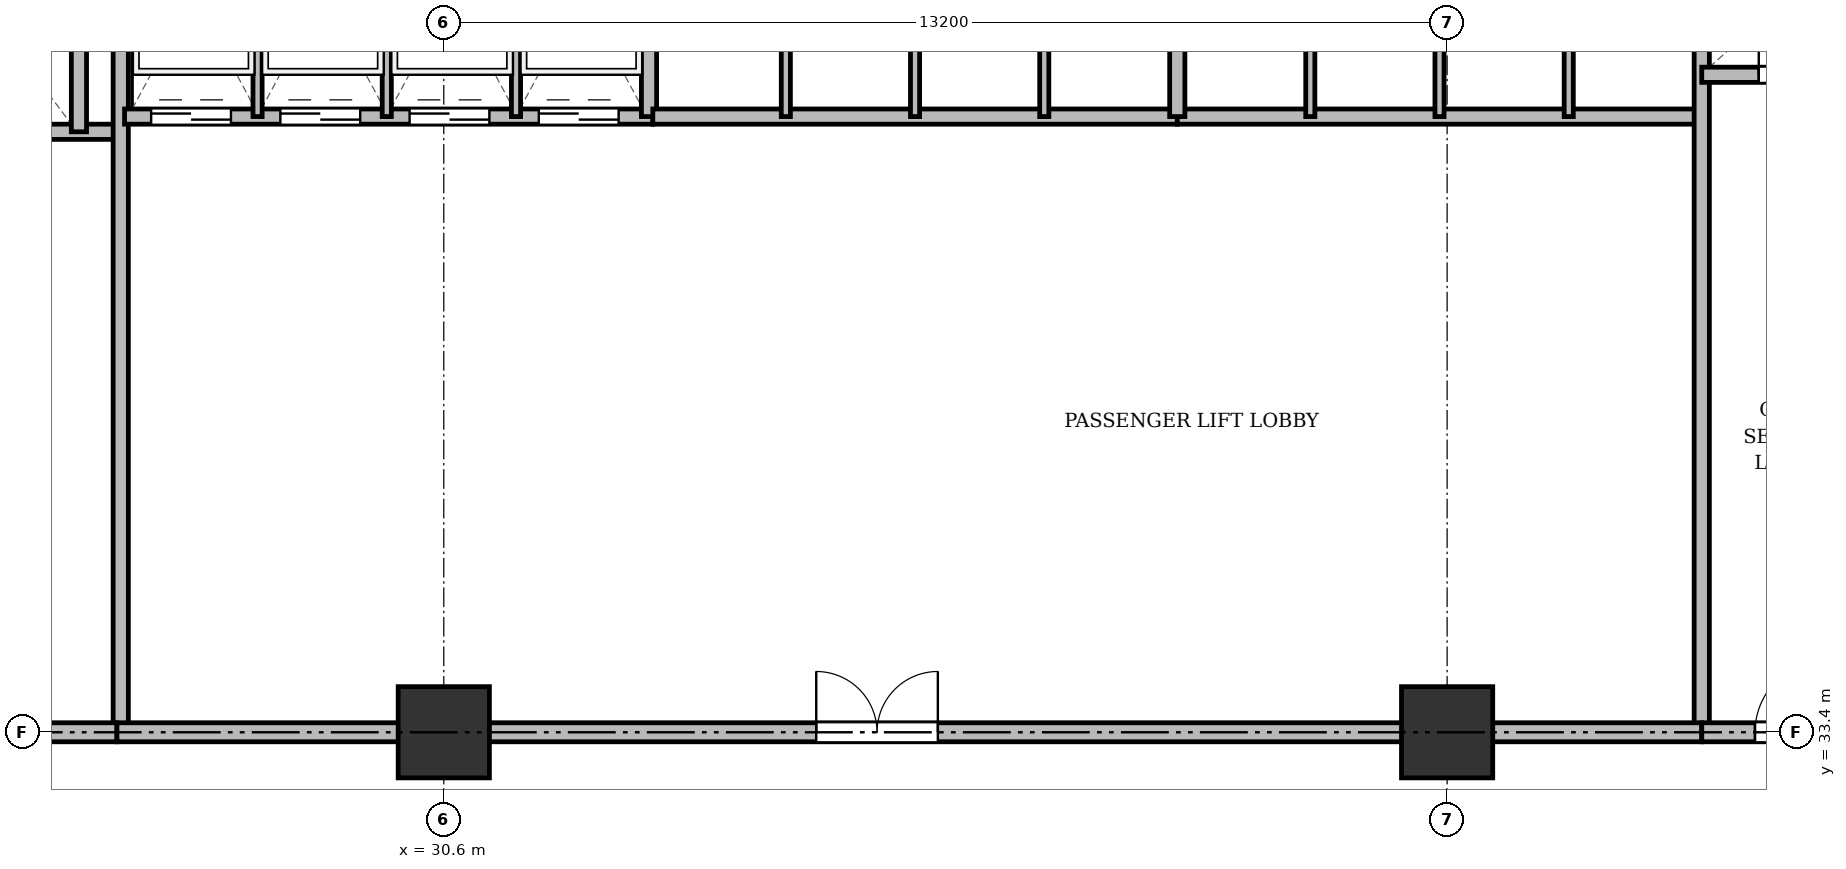
"""IFC4 building model, lengths in metres.
Left out: names, types, materials, properties, quantities, classifications, styles, units other than length and angle.
Written with IfcOpenShell. Run it as: python <this file> out.ifc"""

import sys

from ifc_helpers import new_model, si_unit, direction, frame, frame_2d, origin, origin_2d, place, context, subcontext, project, spatial, rectangle, extrude, source, transform, mapped, element, fill, save


model = new_model("IFC4")
c1 = context("Model", 3, precision=1e-05, world=origin(), true_north=direction((0.0, 1.0)))
c2 = subcontext(c1, "Body", "Model", "MODEL_VIEW")
j1 = project(units=[si_unit("LENGTHUNIT", "METRE"), si_unit("PLANEANGLEUNIT", "RADIAN")], contexts=[c1])
p1 = place(None, origin())
s1 = spatial("IfcSite", under=j1, at=p1, CompositionType="ELEMENT")
p2 = place(p1, origin())
s2 = spatial("IfcBuilding", under=s1, at=p2, CompositionType="ELEMENT")
p3 = place(p2, frame((0.0, 0.0, 5.2)))
s3 = spatial("IfcBuildingStorey", under=s2, at=p3, CompositionType="ELEMENT", Elevation=5.2)
m1 = source(origin(), c2, "Body", "SweptSolid", [
    extrude(rectangle(XDim=1.2, YDim=1.2, at=origin_2d()), origin(), (0.0, 0.0, 1.0), 4.5),
])
for number, where, z_axis, x_axis in (
    (1, (30.6, 33.4, 0.0), (0.0, 0.0, 1.0), (1.0, 0.0, 0.0)),
    (2, (43.8, 33.4, 0.0), (0.0, 0.0, 1.0), (1.0, 0.0, 0.0)),
):
    element("IfcColumn", number, at=place(p3, frame(where, z_axis=z_axis, x_axis=x_axis)), inside=s3, PredefinedType="COLUMN", context=c2, shape_type="MappedRepresentation", body=[
        mapped(m1, transform((0.0, 0.0, 0.0), x_axis=(1.0, 0.0, 0.0), y_axis=(0.0, 1.0, 0.0), z_axis=(0.0, 0.0, 1.0), scale=1.0)),
    ])
p4 = place(p3, frame((19.55, 41.3, 0.0), z_axis=(0.0, 0.0, 1.0), x_axis=(1.0, 0.0, 0.0)))
e3 = element("IfcWall", 3, at=p4, inside=s3, PredefinedType="SOLIDWALL", context=c2, shape_type="SweptSolid", body=[
    extrude(rectangle(XDim=6.75, YDim=0.2, at=frame_2d((3.375, 0.0))), origin(), (0.0, 0.0, 1.0), 4.2),
])
p5 = place(p4, frame((1.7, 0.0, 0.0)))
e4 = element("IfcOpeningElement", 4, at=p5, cuts=e3, PredefinedType="OPENING", context=c2, shape_type="SweptSolid", body=[
    extrude(rectangle(XDim=1.1, YDim=2.15, at=frame_2d((0.55, 1.075))), frame((0.0, 0.11, 0.0), z_axis=(0.0, -1.0, 0.0), x_axis=(1.0, 0.0, 0.0)), (0.0, 0.0, 1.0), 0.22),
])
p6 = place(p4, frame((4.4, 0.0, 0.0)))
e5 = element("IfcOpeningElement", 5, at=p6, cuts=e3, PredefinedType="OPENING", context=c2, shape_type="SweptSolid", body=[
    extrude(rectangle(XDim=1.1, YDim=2.15, at=frame_2d((0.55, 1.075))), frame((0.0, 0.11, 0.0), z_axis=(0.0, -1.0, 0.0), x_axis=(1.0, 0.0, 0.0)), (0.0, 0.0, 1.0), 0.22),
])
p7 = place(p3, frame((25.8, 41.3, 0.0), z_axis=(0.0, 0.0, 1.0), x_axis=(0.0, 1.0, 0.0)))
e6 = element("IfcWall", 6, at=p7, inside=s3, PredefinedType="SOLIDWALL", context=c2, shape_type="SweptSolid", body=[
    extrude(rectangle(XDim=3.4, YDim=0.2, at=frame_2d((1.7, 0.0))), origin(), (0.0, 0.0, 1.0), 4.2),
])
p8 = place(p3, frame((26.35, 33.4, 0.0), z_axis=(0.0, 0.0, 1.0), x_axis=(0.0, 1.0, 0.0)))
e7 = element("IfcWall", 7, at=p8, inside=s3, PredefinedType="SOLIDWALL", context=c2, shape_type="SweptSolid", body=[
    extrude(rectangle(XDim=11.3, YDim=0.2, at=frame_2d((5.65, 0.0))), origin(), (0.0, 0.0, 1.0), 3.1),
])
p9 = place(p3, frame((19.5, 33.4, 0.0), z_axis=(0.0, 0.0, 1.0), x_axis=(1.0, 0.0, 0.0)))
e8 = element("IfcWall", 8, at=p9, inside=s3, PredefinedType="PARTITIONING", context=c2, shape_type="SweptSolid", body=[
    extrude(rectangle(XDim=6.8, YDim=0.25, at=frame_2d((3.4, 0.0))), origin(), (0.0, 0.0, 1.0), 3.1),
])
p10 = place(p9, frame((0.75, 0.0, 0.0)))
e9 = element("IfcOpeningElement", 9, at=p10, cuts=e8, PredefinedType="OPENING", context=c2, shape_type="SweptSolid", body=[
    extrude(rectangle(XDim=1.6, YDim=2.2, at=frame_2d((0.8, 1.1))), frame((0.0, 0.135, 0.0), z_axis=(0.0, -1.0, 0.0), x_axis=(1.0, 0.0, 0.0)), (0.0, 0.0, 1.0), 0.27),
])
p11 = place(p3, frame((26.4, 41.5, 0.0), z_axis=(0.0, 0.0, 1.0), x_axis=(1.0, 0.0, 0.0)))
e10 = element("IfcWall", 10, at=p11, inside=s3, PredefinedType="SOLIDWALL", context=c2, shape_type="SweptSolid", body=[
    extrude(rectangle(XDim=6.95, YDim=0.2, at=frame_2d((3.475, 0.0))), origin(), (0.0, 0.0, 1.0), 4.2),
])
p12 = place(p11, frame((0.35, 0.0, 0.0)))
e11 = element("IfcOpeningElement", 11, at=p12, cuts=e10, PredefinedType="OPENING", context=c2, shape_type="SweptSolid", body=[
    extrude(rectangle(XDim=1.05, YDim=2.15, at=frame_2d((0.525, 1.075))), frame((0.0, 0.11, 0.0), z_axis=(0.0, -1.0, 0.0), x_axis=(1.0, 0.0, 0.0)), (0.0, 0.0, 1.0), 0.22),
])
p13 = place(p11, frame((2.05, 0.0, 0.0)))
e12 = element("IfcOpeningElement", 12, at=p13, cuts=e10, PredefinedType="OPENING", context=c2, shape_type="SweptSolid", body=[
    extrude(rectangle(XDim=1.05, YDim=2.15, at=frame_2d((0.525, 1.075))), frame((0.0, 0.11, 0.0), z_axis=(0.0, -1.0, 0.0), x_axis=(1.0, 0.0, 0.0)), (0.0, 0.0, 1.0), 0.22),
])
p14 = place(p11, frame((3.75, 0.0, 0.0)))
e13 = element("IfcOpeningElement", 13, at=p14, cuts=e10, PredefinedType="OPENING", context=c2, shape_type="SweptSolid", body=[
    extrude(rectangle(XDim=1.05, YDim=2.15, at=frame_2d((0.525, 1.075))), frame((0.0, 0.11, 0.0), z_axis=(0.0, -1.0, 0.0), x_axis=(1.0, 0.0, 0.0)), (0.0, 0.0, 1.0), 0.22),
])
p15 = place(p11, frame((5.45, 0.0, 0.0)))
e14 = element("IfcOpeningElement", 14, at=p15, cuts=e10, PredefinedType="OPENING", context=c2, shape_type="SweptSolid", body=[
    extrude(rectangle(XDim=1.05, YDim=2.15, at=frame_2d((0.525, 1.075))), frame((0.0, 0.11, 0.0), z_axis=(0.0, -1.0, 0.0), x_axis=(1.0, 0.0, 0.0)), (0.0, 0.0, 1.0), 0.22),
])
p16 = place(p3, frame((33.3, 41.5, 0.0), z_axis=(0.0, 0.0, 1.0), x_axis=(0.0, 1.0, 0.0)))
e15 = element("IfcWall", 15, at=p16, inside=s3, PredefinedType="SOLIDWALL", context=c2, shape_type="SweptSolid", body=[
    extrude(rectangle(XDim=3.2, YDim=0.2, at=frame_2d((1.6, 0.0))), origin(), (0.0, 0.0, 1.0), 4.2),
])
for number, where, z_axis, x_axis in (
    (16, (28.15, 41.5, 0.0), (0.0, 0.0, 1.0), (0.0, 1.0, 0.0)),
    (17, (29.85, 41.5, 0.0), (0.0, 0.0, 1.0), (0.0, 1.0, 0.0)),
    (18, (31.55, 41.5, 0.0), (0.0, 0.0, 1.0), (0.0, 1.0, 0.0)),
):
    element("IfcWall", number, at=place(p3, frame(where, z_axis=z_axis, x_axis=x_axis)), inside=s3, PredefinedType="PARTITIONING", context=c2, shape_type="SweptSolid", body=[
        extrude(rectangle(XDim=3.2, YDim=0.12, at=frame_2d((1.6, 0.0))), origin(), (0.0, 0.0, 1.0), 4.2),
    ])
p17 = place(p3, frame((33.35, 41.5, 0.0), z_axis=(0.0, 0.0, 1.0), x_axis=(1.0, 0.0, 0.0)))
e19 = element("IfcWall", 19, at=p17, inside=s3, PredefinedType="SOLIDWALL", context=c2, shape_type="SweptSolid", body=[
    extrude(rectangle(XDim=6.9, YDim=0.2, at=frame_2d((3.45, 0.0))), origin(), (0.0, 0.0, 1.0), 4.2),
])
for number, where, z_axis, x_axis in (
    (20, (35.1, 41.5, 0.0), (0.0, 0.0, 1.0), (0.0, 1.0, 0.0)),
    (21, (36.8, 41.5, 0.0), (0.0, 0.0, 1.0), (0.0, 1.0, 0.0)),
    (22, (38.5, 41.5, 0.0), (0.0, 0.0, 1.0), (0.0, 1.0, 0.0)),
):
    element("IfcWall", number, at=place(p3, frame(where, z_axis=z_axis, x_axis=x_axis)), inside=s3, PredefinedType="PARTITIONING", context=c2, shape_type="SweptSolid", body=[
        extrude(rectangle(XDim=3.2, YDim=0.12, at=frame_2d((1.6, 0.0))), origin(), (0.0, 0.0, 1.0), 4.2),
    ])
p18 = place(p3, frame((40.25, 41.5, 0.0), z_axis=(0.0, 0.0, 1.0), x_axis=(1.0, 0.0, 0.0)))
e23 = element("IfcWall", 23, at=p18, inside=s3, PredefinedType="SOLIDWALL", context=c2, shape_type="SweptSolid", body=[
    extrude(rectangle(XDim=6.9, YDim=0.2, at=frame_2d((3.45, 0.0))), origin(), (0.0, 0.0, 1.0), 3.4),
])
p19 = place(p3, frame((40.25, 41.5, 0.0), z_axis=(0.0, 0.0, 1.0), x_axis=(0.0, 1.0, 0.0)))
e24 = element("IfcWall", 24, at=p19, inside=s3, PredefinedType="SOLIDWALL", context=c2, shape_type="SweptSolid", body=[
    extrude(rectangle(XDim=3.2, YDim=0.2, at=frame_2d((1.6, 0.0))), origin(), (0.0, 0.0, 1.0), 4.2),
])
p20 = place(p3, frame((42.0, 41.5, 0.0), z_axis=(0.0, 0.0, 1.0), x_axis=(0.0, 1.0, 0.0)))
e25 = element("IfcWall", 25, at=p20, inside=s3, PredefinedType="PARTITIONING", context=c2, shape_type="SweptSolid", body=[
    extrude(rectangle(XDim=3.2, YDim=0.12, at=frame_2d((1.6, 0.0))), origin(), (0.0, 0.0, 1.0), 4.2),
])
p21 = place(p3, frame((43.7, 41.5, 0.0), z_axis=(0.0, 0.0, 1.0), x_axis=(0.0, 1.0, 0.0)))
e26 = element("IfcWall", 26, at=p21, inside=s3, PredefinedType="PARTITIONING", context=c2, shape_type="SweptSolid", body=[
    extrude(rectangle(XDim=3.2, YDim=0.12, at=frame_2d((1.6, 0.0))), origin(), (0.0, 0.0, 1.0), 3.4),
])
p22 = place(p3, frame((45.4, 41.5, 0.0), z_axis=(0.0, 0.0, 1.0), x_axis=(0.0, 1.0, 0.0)))
e27 = element("IfcWall", 27, at=p22, inside=s3, PredefinedType="PARTITIONING", context=c2, shape_type="SweptSolid", body=[
    extrude(rectangle(XDim=3.2, YDim=0.12, at=frame_2d((1.6, 0.0))), origin(), (0.0, 0.0, 1.0), 4.2),
])
p23 = place(p3, frame((47.15, 33.4, 0.0), z_axis=(0.0, 0.0, 1.0), x_axis=(0.0, 1.0, 0.0)))
e28 = element("IfcWall", 28, at=p23, inside=s3, PredefinedType="SOLIDWALL", context=c2, shape_type="SweptSolid", body=[
    extrude(rectangle(XDim=11.3, YDim=0.2, at=frame_2d((5.65, 0.0))), origin(), (0.0, 0.0, 1.0), 3.1),
])
p24 = place(p3, frame((26.3, 33.4, 0.0), z_axis=(0.0, 0.0, 1.0), x_axis=(1.0, 0.0, 0.0)))
e29 = element("IfcWall", 29, at=p24, inside=s3, PredefinedType="PARTITIONING", context=c2, shape_type="SweptSolid", body=[
    extrude(rectangle(XDim=20.85, YDim=0.25, at=frame_2d((10.425, 0.0))), origin(), (0.0, 0.0, 1.0), 3.1),
])
p25 = place(p24, frame((9.2, 0.0, 0.0)))
e30 = element("IfcOpeningElement", 30, at=p25, cuts=e29, PredefinedType="OPENING", context=c2, shape_type="SweptSolid", body=[
    extrude(rectangle(XDim=1.6, YDim=2.2, at=frame_2d((0.8, 1.1))), frame((0.0, 0.135, 0.0), z_axis=(0.0, -1.0, 0.0), x_axis=(1.0, 0.0, 0.0)), (0.0, 0.0, 1.0), 0.27),
])
p26 = place(p3, frame((47.15, 42.05, 0.0), z_axis=(0.0, 0.0, 1.0), x_axis=(1.0, 0.0, 0.0)))
e31 = element("IfcWall", 31, at=p26, inside=s3, PredefinedType="SOLIDWALL", context=c2, shape_type="SweptSolid", body=[
    extrude(rectangle(XDim=7.85, YDim=0.2, at=frame_2d((3.925, 0.0))), origin(), (0.0, 0.0, 1.0), 4.2),
])
p27 = place(p26, frame((0.75, 0.0, 0.0)))
e32 = element("IfcOpeningElement", 32, at=p27, cuts=e31, PredefinedType="OPENING", context=c2, shape_type="SweptSolid", body=[
    extrude(rectangle(XDim=0.9, YDim=2.1, at=frame_2d((0.45, 1.05))), frame((0.0, 0.11, 0.0), z_axis=(0.0, -1.0, 0.0), x_axis=(1.0, 0.0, 0.0)), (0.0, 0.0, 1.0), 0.22),
])
p28 = place(p26, frame((3.85, 0.0, 0.0)))
e33 = element("IfcOpeningElement", 33, at=p28, cuts=e31, PredefinedType="OPENING", context=c2, shape_type="SweptSolid", body=[
    extrude(rectangle(XDim=0.9, YDim=2.1, at=frame_2d((0.45, 1.05))), frame((0.0, 0.11, 0.0), z_axis=(0.0, -1.0, 0.0), x_axis=(1.0, 0.0, 0.0)), (0.0, 0.0, 1.0), 0.22),
])
p29 = place(p3, frame((47.15, 33.4, 0.0), z_axis=(0.0, 0.0, 1.0), x_axis=(1.0, 0.0, 0.0)))
e34 = element("IfcWall", 34, at=p29, inside=s3, PredefinedType="PARTITIONING", context=c2, shape_type="SweptSolid", body=[
    extrude(rectangle(XDim=11.15, YDim=0.25, at=frame_2d((5.575, 0.0))), origin(), (0.0, 0.0, 1.0), 3.1),
])
p30 = place(p29, frame((0.7, 0.0, 0.0)))
e35 = element("IfcOpeningElement", 35, at=p30, cuts=e34, PredefinedType="OPENING", context=c2, shape_type="SweptSolid", body=[
    extrude(rectangle(XDim=0.95, YDim=2.15, at=frame_2d((0.475, 1.075))), frame((0.0, 0.135, 0.0), z_axis=(0.0, -1.0, 0.0), x_axis=(1.0, 0.0, 0.0)), (0.0, 0.0, 1.0), 0.27),
])
p31 = place(p29, frame((6.0, 0.0, 0.0)))
e36 = element("IfcOpeningElement", 36, at=p31, cuts=e34, PredefinedType="OPENING", context=c2, shape_type="SweptSolid", body=[
    extrude(rectangle(XDim=1.2, YDim=2.15, at=frame_2d((0.6, 1.075))), frame((0.0, 0.135, 0.0), z_axis=(0.0, -1.0, 0.0), x_axis=(1.0, 0.0, 0.0)), (0.0, 0.0, 1.0), 0.27),
])
m2 = source(origin(), c2, "Body", "SweptSolid", [
    extrude(rectangle(XDim=1.05, YDim=2.15, at=frame_2d((0.525, 1.075))), frame((0.0, 0.025, 0.0), z_axis=(0.0, -1.0, 0.0), x_axis=(1.0, 0.0, 0.0)), (0.0, 0.0, 1.0), 0.05),
])
p32 = place(p12, origin())
e37 = element("IfcDoor", 37, at=p32, inside=s3, OperationType="DOUBLE_DOOR_SLIDING", PredefinedType="DOOR", context=c2, shape_type="MappedRepresentation", body=[
    mapped(m2, transform((0.0, 0.0, 0.0), x_axis=(1.0, 0.0, 0.0), y_axis=(0.0, 1.0, 0.0), z_axis=(0.0, 0.0, 1.0), scale=1.0)),
])
fill(e11, e37)
p33 = place(p13, origin())
e38 = element("IfcDoor", 38, at=p33, inside=s3, OperationType="DOUBLE_DOOR_SLIDING", PredefinedType="DOOR", context=c2, shape_type="MappedRepresentation", body=[
    mapped(m2, transform((0.0, 0.0, 0.0), x_axis=(1.0, 0.0, 0.0), y_axis=(0.0, 1.0, 0.0), z_axis=(0.0, 0.0, 1.0), scale=1.0)),
])
fill(e12, e38)
p34 = place(p14, origin())
e39 = element("IfcDoor", 39, at=p34, inside=s3, OperationType="DOUBLE_DOOR_SLIDING", PredefinedType="DOOR", context=c2, shape_type="MappedRepresentation", body=[
    mapped(m2, transform((0.0, 0.0, 0.0), x_axis=(1.0, 0.0, 0.0), y_axis=(0.0, 1.0, 0.0), z_axis=(0.0, 0.0, 1.0), scale=1.0)),
])
fill(e13, e39)
p35 = place(p15, origin())
e40 = element("IfcDoor", 40, at=p35, inside=s3, OperationType="DOUBLE_DOOR_SLIDING", PredefinedType="DOOR", context=c2, shape_type="MappedRepresentation", body=[
    mapped(m2, transform((0.0, 0.0, 0.0), x_axis=(1.0, 0.0, 0.0), y_axis=(0.0, 1.0, 0.0), z_axis=(0.0, 0.0, 1.0), scale=1.0)),
])
fill(e14, e40)
m3 = source(origin(), c2, "Body", "SweptSolid", [
    extrude(rectangle(XDim=1.6, YDim=2.2, at=frame_2d((0.8, 1.1))), frame((0.0, 0.025, 0.0), z_axis=(0.0, -1.0, 0.0), x_axis=(1.0, 0.0, 0.0)), (0.0, 0.0, 1.0), 0.05),
])
p36 = place(p25, origin())
e41 = element("IfcDoor", 41, at=p36, inside=s3, OperationType="DOUBLE_DOOR_SINGLE_SWING", PredefinedType="DOOR", context=c2, shape_type="MappedRepresentation", body=[
    mapped(m3, transform((0.0, 0.0, 0.0), x_axis=(1.0, 0.0, 0.0), y_axis=(0.0, 1.0, 0.0), z_axis=(0.0, 0.0, 1.0), scale=1.0)),
])
fill(e30, e41)
m4 = source(origin(), c2, "Body", "SweptSolid", [
    extrude(rectangle(XDim=0.9, YDim=2.1, at=frame_2d((0.45, 1.05))), frame((0.0, 0.025, 0.0), z_axis=(0.0, -1.0, 0.0), x_axis=(1.0, 0.0, 0.0)), (0.0, 0.0, 1.0), 0.05),
])
p37 = place(p27, origin())
e42 = element("IfcDoor", 42, at=p37, inside=s3, OperationType="SINGLE_SWING_LEFT", PredefinedType="DOOR", context=c2, shape_type="MappedRepresentation", body=[
    mapped(m4, transform((0.0, 0.0, 0.0), x_axis=(1.0, 0.0, 0.0), y_axis=(0.0, 1.0, 0.0), z_axis=(0.0, 0.0, 1.0), scale=1.0)),
])
fill(e32, e42)
m5 = source(origin(), c2, "Body", "SweptSolid", [
    extrude(rectangle(XDim=0.95, YDim=2.15, at=frame_2d((0.475, 1.075))), frame((0.0, 0.025, 0.0), z_axis=(0.0, -1.0, 0.0), x_axis=(1.0, 0.0, 0.0)), (0.0, 0.0, 1.0), 0.05),
])
p38 = place(p30, origin())
e43 = element("IfcDoor", 43, at=p38, inside=s3, OperationType="SINGLE_SWING_RIGHT", PredefinedType="DOOR", context=c2, shape_type="MappedRepresentation", body=[
    mapped(m5, transform((0.0, 0.0, 0.0), x_axis=(1.0, 0.0, 0.0), y_axis=(0.0, 1.0, 0.0), z_axis=(0.0, 0.0, 1.0), scale=1.0)),
])
fill(e35, e43)
save(model, sys.argv[1])
